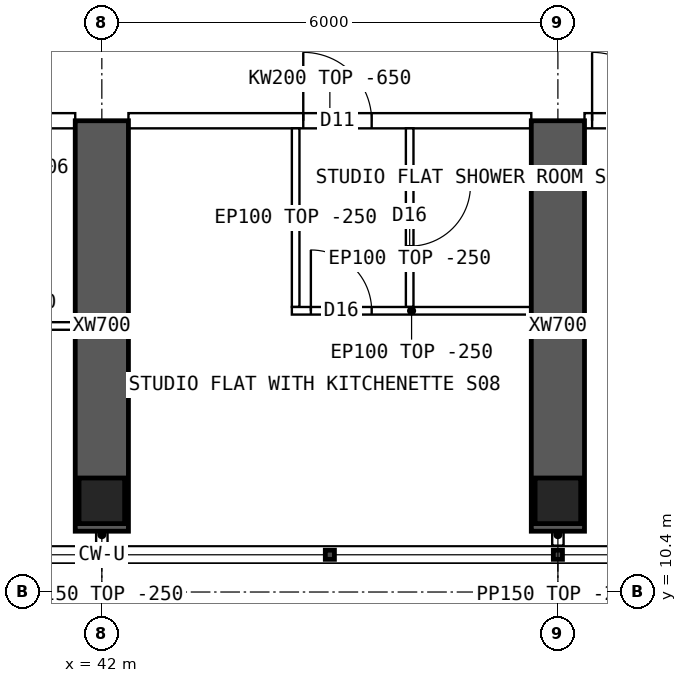
"""IFC4 building model, lengths in metres.
Left out: names, types, materials, properties, quantities, classifications, styles, units other than length and angle.
Written with IfcOpenShell. Run it as: python <this file> out.ifc"""

import sys

from ifc_helpers import new_model, si_unit, direction, frame, frame_2d, origin, origin_2d, place, context, subcontext, project, spatial, polyline, rectangle, hollow_rectangle, outline, extrude, element, fill, save


model = new_model("IFC4")
c1 = context("Model", 3, precision=1e-05, world=origin(), true_north=direction((0.0, 1.0)))
c2 = subcontext(c1, "Body", "Model", "MODEL_VIEW")
j1 = project(units=[si_unit("LENGTHUNIT", "METRE"), si_unit("PLANEANGLEUNIT", "RADIAN")], contexts=[c1])
p1 = place(None, origin())
s1 = spatial("IfcSite", under=j1, at=p1, CompositionType="ELEMENT")
p2 = place(p1, origin())
s2 = spatial("IfcBuilding", under=s1, at=p2, CompositionType="ELEMENT")
p3 = place(p2, frame((0.0, 0.0, 220.3)))
s3 = spatial("IfcBuildingStorey", under=s2, at=p3, CompositionType="ELEMENT", Elevation=220.3)
for number, where, z_axis, x_axis in (
    (1, (42.0, 11.6, 0.0), (0.0, 0.0, 1.0), (1.0, 0.0, 0.0)),
    (2, (48.0, 11.6, 0.0), (0.0, 0.0, 1.0), (1.0, 0.0, 0.0)),
):
    element("IfcColumn", number, at=place(p3, frame(where, z_axis=z_axis, x_axis=x_axis)), inside=s3, PredefinedType="COLUMN", context=c2, shape_type="SweptSolid", body=[
        extrude(hollow_rectangle(XDim=0.6, YDim=0.6, WallThickness=0.06, at=origin_2d()), origin(), (0.0, 0.0, 1.0), 3.75),
    ])
for number, where, z_axis, x_axis in (
    (3, (42.0, 11.2, 0.0), (0.0, 0.0, 1.0), (0.0, 1.0, 0.0)),
    (4, (48.0, 11.2, 0.0), (0.0, 0.0, 1.0), (0.0, 1.0, 0.0)),
):
    element("IfcWall", number, at=place(p3, frame(where, z_axis=z_axis, x_axis=x_axis)), inside=s3, PredefinedType="SHEAR", context=c2, shape_type="SweptSolid", body=[
        extrude(rectangle(XDim=5.4, YDim=0.7, at=frame_2d((2.7, 0.0))), origin(), (0.0, 0.0, 1.0), 3.75),
    ])
p4 = place(p3, frame((36.35, 16.6, 0.0), z_axis=(0.0, 0.0, 1.0), x_axis=(1.0, 0.0, 0.0)))
e5 = element("IfcWall", 5, at=p4, inside=s3, PredefinedType="SOLIDWALL", context=c2, shape_type="SweptSolid", body=[
    extrude(outline(polyline([(0.0, 0.0), (5.3, 0.0), (5.3, 3.1), (0.0, 3.1), (0.0, 0.0)])), frame((0.0, 0.1, 0.0), z_axis=(0.0, -1.0, 0.0), x_axis=(1.0, 0.0, 0.0)), (0.0, 0.0, 1.0), 0.2),
])
p5 = place(p4, frame((0.3, 0.0, 0.0)))
e6 = element("IfcOpeningElement", 6, at=p5, cuts=e5, PredefinedType="OPENING", context=c2, shape_type="SweptSolid", body=[
    extrude(rectangle(XDim=1.0, YDim=2.1, at=frame_2d((0.5, 1.05))), frame((0.0, 0.11, 0.0), z_axis=(0.0, -1.0, 0.0), x_axis=(1.0, 0.0, 0.0)), (0.0, 0.0, 1.0), 0.22),
])
p6 = place(p3, frame((42.35, 16.6, 0.0), z_axis=(0.0, 0.0, 1.0), x_axis=(1.0, 0.0, 0.0)))
e7 = element("IfcWall", 7, at=p6, inside=s3, PredefinedType="SOLIDWALL", context=c2, shape_type="SweptSolid", body=[
    extrude(outline(polyline([(0.0, 0.0), (5.3, 0.0), (5.3, 3.1), (0.0, 3.1), (0.0, 0.0)])), frame((0.0, 0.1, 0.0), z_axis=(0.0, -1.0, 0.0), x_axis=(1.0, 0.0, 0.0)), (0.0, 0.0, 1.0), 0.2),
])
p7 = place(p6, frame((2.3, 0.0, 0.0)))
e8 = element("IfcOpeningElement", 8, at=p7, cuts=e7, PredefinedType="OPENING", context=c2, shape_type="SweptSolid", body=[
    extrude(rectangle(XDim=0.9, YDim=2.1, at=frame_2d((0.45, 1.05))), frame((0.0, 0.11, 0.0), z_axis=(0.0, -1.0, 0.0), x_axis=(1.0, 0.0, 0.0)), (0.0, 0.0, 1.0), 0.22),
])
p8 = place(p3, frame((48.35, 16.6, 0.0), z_axis=(0.0, 0.0, 1.0), x_axis=(1.0, 0.0, 0.0)))
e9 = element("IfcWall", 9, at=p8, inside=s3, PredefinedType="SOLIDWALL", context=c2, shape_type="SweptSolid", body=[
    extrude(outline(polyline([(0.0, 0.0), (5.3, 0.0), (5.3, 3.1), (0.0, 3.1), (0.0, 0.0)])), frame((0.0, 0.1, 0.0), z_axis=(0.0, -1.0, 0.0), x_axis=(1.0, 0.0, 0.0)), (0.0, 0.0, 1.0), 0.2),
])
p9 = place(p8, frame((0.1, 0.0, 0.0)))
e10 = element("IfcOpeningElement", 10, at=p9, cuts=e9, PredefinedType="OPENING", context=c2, shape_type="SweptSolid", body=[
    extrude(rectangle(XDim=0.9, YDim=2.1, at=frame_2d((0.45, 1.05))), frame((0.0, 0.11, 0.0), z_axis=(0.0, -1.0, 0.0), x_axis=(1.0, 0.0, 0.0)), (0.0, 0.0, 1.0), 0.22),
])
p10 = place(p3, frame((39.0, 13.9, 0.0), z_axis=(0.0, 0.0, 1.0), x_axis=(1.0, 0.0, 0.0)))
e11 = element("IfcWall", 11, at=p10, inside=s3, PredefinedType="PARTITIONING", context=c2, shape_type="SweptSolid", body=[
    extrude(rectangle(XDim=2.65, YDim=0.1, at=frame_2d((1.325, 0.0))), origin(), (0.0, 0.0, 1.0), 3.5),
])
p11 = place(p3, frame((47.65, 14.1, 0.0), z_axis=(0.0, 0.0, 1.0), x_axis=(-1.0, 0.0, 0.0)))
e12 = element("IfcWall", 12, at=p11, inside=s3, PredefinedType="PARTITIONING", context=c2, shape_type="SweptSolid", body=[
    extrude(rectangle(XDim=3.15, YDim=0.1, at=frame_2d((1.575, 0.0))), origin(), (0.0, 0.0, 1.0), 3.5),
])
p12 = place(p11, frame((2.1, 0.0, 0.0)))
e13 = element("IfcOpeningElement", 13, at=p12, cuts=e12, PredefinedType="OPENING", context=c2, shape_type="SweptSolid", body=[
    extrude(rectangle(XDim=0.8, YDim=2.1, at=frame_2d((0.4, 1.05))), frame((0.0, 0.06, 0.0), z_axis=(0.0, -1.0, 0.0), x_axis=(1.0, 0.0, 0.0)), (0.0, 0.0, 1.0), 0.12),
])
p13 = place(p3, frame((44.55, 14.15, 0.0), z_axis=(0.0, 0.0, 1.0), x_axis=(0.0, 1.0, 0.0)))
e14 = element("IfcWall", 14, at=p13, inside=s3, PredefinedType="PARTITIONING", context=c2, shape_type="SweptSolid", body=[
    extrude(outline(polyline([(0.0, 0.0), (2.35, 0.0), (2.35, 3.1), (2.302, 3.1), (2.3, 3.5), (0.0, 3.5), (0.0, 0.0)])), frame((0.0, 0.05, 0.0), z_axis=(0.0, -1.0, 0.0), x_axis=(1.0, 0.0, 0.0)), (0.0, 0.0, 1.0), 0.1),
])
p14 = place(p3, frame((46.05, 14.15, 0.0), z_axis=(0.0, 0.0, 1.0), x_axis=(0.0, 1.0, 0.0)))
e15 = element("IfcWall", 15, at=p14, inside=s3, PredefinedType="PARTITIONING", context=c2, shape_type="SweptSolid", body=[
    extrude(outline(polyline([(0.0, 0.0), (2.35, 0.0), (2.35, 3.1), (2.302, 3.1), (2.3, 3.5), (0.0, 3.5), (0.0, 0.0)])), frame((0.0, 0.05, 0.0), z_axis=(0.0, -1.0, 0.0), x_axis=(1.0, 0.0, 0.0)), (0.0, 0.0, 1.0), 0.1),
])
p15 = place(p14, frame((0.8, 0.0, 0.0)))
e16 = element("IfcOpeningElement", 16, at=p15, cuts=e15, PredefinedType="OPENING", context=c2, shape_type="SweptSolid", body=[
    extrude(rectangle(XDim=0.8, YDim=2.1, at=frame_2d((0.4, 1.05))), frame((0.0, 0.06, 0.0), z_axis=(0.0, -1.0, 0.0), x_axis=(1.0, 0.0, 0.0)), (0.0, 0.0, 1.0), 0.12),
])
for number, where, z_axis, x_axis in (
    (17, (42.0, 11.3, 0.0), (0.0, 0.0, 1.0), (0.0, -1.0, 0.0)),
    (18, (48.0, 11.3, 0.0), (0.0, 0.0, 1.0), (0.0, -1.0, 0.0)),
):
    element("IfcWall", number, at=place(p3, frame(where, z_axis=z_axis, x_axis=x_axis)), inside=s3, PredefinedType="PARTITIONING", context=c2, shape_type="SweptSolid", body=[
        extrude(rectangle(XDim=0.29, YDim=0.15, at=frame_2d((0.145, 0.0))), origin(), (0.0, 0.0, 1.0), 3.5),
    ])
p16 = place(p12, origin())
e19 = element("IfcDoor", 19, at=p16, inside=s3, OperationType="SINGLE_SWING_RIGHT", PredefinedType="DOOR", context=c2, shape_type="SweptSolid", body=[
    extrude(rectangle(XDim=0.8, YDim=2.1, at=frame_2d((0.4, 1.05))), frame((0.0, 0.025, 0.0), z_axis=(0.0, -1.0, 0.0), x_axis=(1.0, 0.0, 0.0)), (0.0, 0.0, 1.0), 0.05),
])
fill(e13, e19)
p17 = place(p15, origin())
e20 = element("IfcDoor", 20, at=p17, inside=s3, OperationType="SINGLE_SWING_RIGHT", PredefinedType="DOOR", context=c2, shape_type="SweptSolid", body=[
    extrude(rectangle(XDim=0.8, YDim=2.1, at=frame_2d((0.4, 1.05))), frame((0.0, 0.025, 0.0), z_axis=(0.0, -1.0, 0.0), x_axis=(1.0, 0.0, 0.0)), (0.0, 0.0, 1.0), 0.05),
])
fill(e16, e20)
p18 = place(p7, origin())
e21 = element("IfcDoor", 21, at=p18, inside=s3, OperationType="SINGLE_SWING_LEFT", PredefinedType="DOOR", context=c2, shape_type="SweptSolid", body=[
    extrude(rectangle(XDim=0.9, YDim=2.1, at=frame_2d((0.45, 1.05))), frame((0.0, 0.025, 0.0), z_axis=(0.0, -1.0, 0.0), x_axis=(1.0, 0.0, 0.0)), (0.0, 0.0, 1.0), 0.05),
])
fill(e8, e21)
p19 = place(p9, origin())
e22 = element("IfcDoor", 22, at=p19, inside=s3, OperationType="SINGLE_SWING_LEFT", PredefinedType="DOOR", context=c2, shape_type="SweptSolid", body=[
    extrude(rectangle(XDim=0.9, YDim=2.1, at=frame_2d((0.45, 1.05))), frame((0.0, 0.025, 0.0), z_axis=(0.0, -1.0, 0.0), x_axis=(1.0, 0.0, 0.0)), (0.0, 0.0, 1.0), 0.05),
])
fill(e10, e22)
save(model, sys.argv[1])
